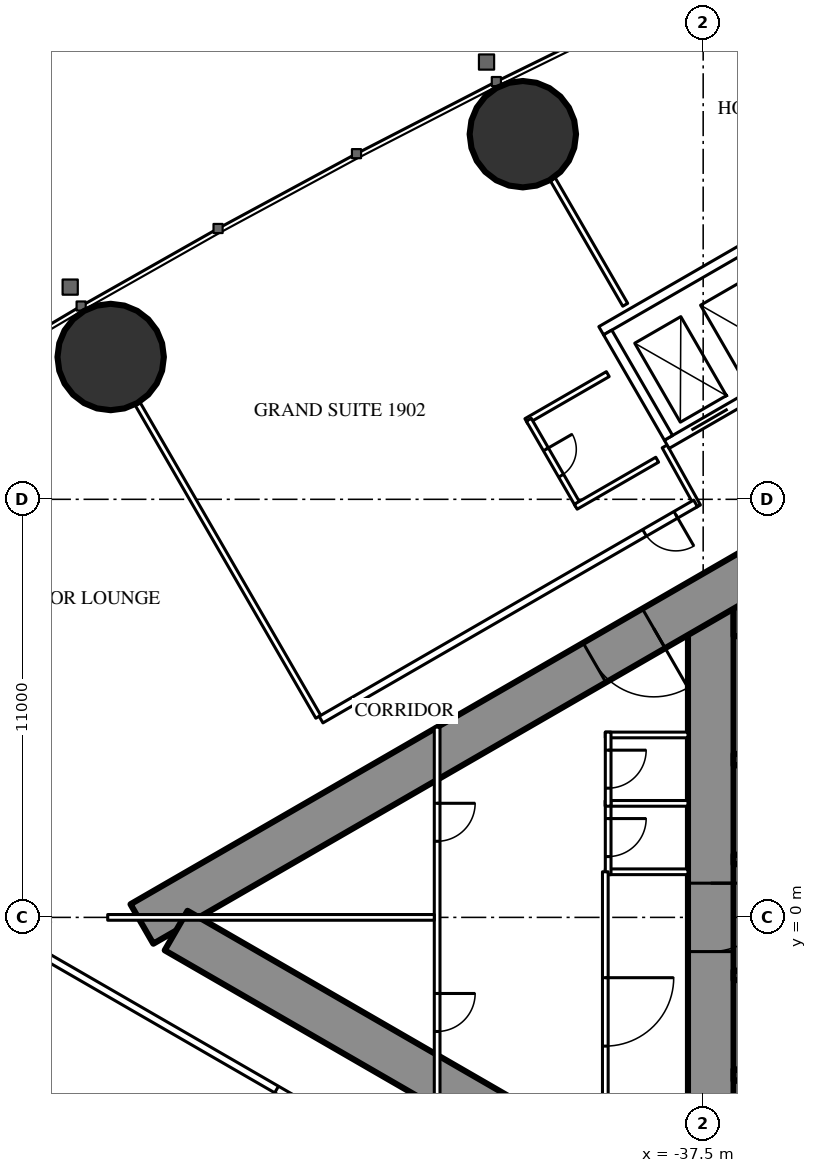
"""IFC4 building model, lengths in metres.
Left out: names, types, materials, properties, quantities, classifications, styles, units other than length and angle.
Written with IfcOpenShell. Run it as: python <this file> out.ifc"""

import sys

from ifc_helpers import new_model, si_unit, direction, frame, frame_2d, origin, origin_2d, place, context, subcontext, project, spatial, rectangle, hollow_circle, extrude, element, fill, save


model = new_model("IFC4")
c1 = context("Model", 3, precision=1e-05, world=origin(), true_north=direction((0.0, 1.0)))
c2 = subcontext(c1, "Body", "Model", "MODEL_VIEW")
j1 = project(units=[si_unit("LENGTHUNIT", "METRE"), si_unit("PLANEANGLEUNIT", "RADIAN")], contexts=[c1])
p1 = place(None, origin())
s1 = spatial("IfcSite", under=j1, at=p1, CompositionType="ELEMENT")
p2 = place(p1, origin())
s2 = spatial("IfcBuilding", under=s1, at=p2, CompositionType="ELEMENT")
p3 = place(p2, frame((0.0, 0.0, 74.0)))
s3 = spatial("IfcBuildingStorey", under=s2, at=p3, CompositionType="ELEMENT", Elevation=74.0)
for number, where, z_axis, x_axis in (
    (1, (-42.245, 20.607, 0.0), (0.0, 0.0, 1.0), (1.0, 0.0, 0.0)),
    (2, (-53.09, 14.745, 0.0), (0.0, 0.0, 1.0), (1.0, 0.0, 0.0)),
):
    element("IfcColumn", number, at=place(p3, frame(where, z_axis=z_axis, x_axis=x_axis)), inside=s3, PredefinedType="COLUMN", context=c2, shape_type="SweptSolid", body=[
        extrude(hollow_circle(Radius=1.4, WallThickness=0.12, at=origin_2d()), origin(), (0.0, 0.0, 1.0), 3.5),
    ])
p4 = place(p3, frame((-37.3, 8.6, 0.0), z_axis=(0.0, 0.0, 1.0), x_axis=(0.0, -1.0, 0.0)))
e3 = element("IfcWall", 3, at=p4, inside=s3, PredefinedType="SHEAR", context=c2, shape_type="SweptSolid", body=[
    extrude(rectangle(XDim=17.2, YDim=1.2, at=frame_2d((8.6, 0.0))), origin(), (0.0, 0.0, 1.0), 3.5),
])
p5 = place(p4, frame((7.7, 0.0, 0.0)))
e4 = element("IfcOpeningElement", 4, at=p5, cuts=e3, PredefinedType="OPENING", context=c2, shape_type="SweptSolid", body=[
    extrude(rectangle(XDim=1.8, YDim=2.2, at=frame_2d((0.9, 1.1))), frame((0.0, 0.61, 0.0), z_axis=(0.0, -1.0, 0.0), x_axis=(1.0, 0.0, 0.0)), (0.0, 0.0, 1.0), 1.22),
])
p6 = place(p3, frame((-28.3, 8.0, 0.0), z_axis=(0.0, 0.0, 1.0), x_axis=(-1.0, 0.0, 0.0)))
e5 = element("IfcWall", 5, at=p6, inside=s3, PredefinedType="SHEAR", context=c2, shape_type="SweptSolid", body=[
    extrude(rectangle(XDim=8.4, YDim=1.2, at=frame_2d((4.2, 0.0))), origin(), (0.0, 0.0, 1.0), 3.5),
])
p7 = place(p6, frame((0.25, 0.0, 0.0)))
e6 = element("IfcOpeningElement", 6, at=p7, cuts=e5, PredefinedType="OPENING", context=c2, shape_type="SweptSolid", body=[
    extrude(rectangle(XDim=1.0, YDim=2.2, at=frame_2d((0.5, 1.1))), frame((0.0, 0.61, 0.0), z_axis=(0.0, -1.0, 0.0), x_axis=(1.0, 0.0, 0.0)), (0.0, 0.0, 1.0), 1.22),
])
for number, where, z_axis, x_axis in (
    (7, (-28.3, 4.15, 0.0), (0.0, 0.0, 1.0), (-1.0, 0.0, 0.0)),
    (8, (-28.3, -4.15, 0.0), (0.0, 0.0, 1.0), (-1.0, 0.0, 0.0)),
):
    element("IfcWall", number, at=place(p3, frame(where, z_axis=z_axis, x_axis=x_axis)), inside=s3, PredefinedType="SHEAR", context=c2, shape_type="SweptSolid", body=[
        extrude(rectangle(XDim=8.4, YDim=0.3, at=frame_2d((4.2, 0.0))), origin(), (0.0, 0.0, 1.0), 3.5),
    ])
for number, where, z_axis, x_axis in (
    (9, (-34.25, 1.525, 0.0), (0.0, 0.0, 1.0), (-1.0, 0.0, 0.0)),
    (10, (-34.25, -1.525, 0.0), (0.0, 0.0, 1.0), (-1.0, 0.0, 0.0)),
):
    element("IfcWall", number, at=place(p3, frame(where, z_axis=z_axis, x_axis=x_axis)), inside=s3, PredefinedType="SHEAR", context=c2, shape_type="SweptSolid", body=[
        extrude(rectangle(XDim=2.45, YDim=0.25, at=frame_2d((1.225, 0.0))), origin(), (0.0, 0.0, 1.0), 3.5),
    ])
p8 = place(p3, frame((-27.2, 14.3, 0.0), z_axis=(0.0, 0.0, 1.0), x_axis=(-0.866026593062, -0.499997940104, 0.0)))
e11 = element("IfcWall", 11, at=p8, inside=s3, PredefinedType="SHEAR", context=c2, shape_type="SweptSolid", body=[
    extrude(rectangle(XDim=28.946, YDim=1.2, at=frame_2d((14.473, 0.0))), origin(), (0.0, 0.0, 1.0), 3.5),
])
p9 = place(p8, frame((4.6, 0.0, 0.0)))
e12 = element("IfcOpeningElement", 12, at=p9, cuts=e11, PredefinedType="OPENING", context=c2, shape_type="SweptSolid", body=[
    extrude(rectangle(XDim=1.0, YDim=2.2, at=frame_2d((0.5, 1.1))), frame((0.0, 0.61, 0.0), z_axis=(0.0, -1.0, 0.0), x_axis=(1.0, 0.0, 0.0)), (0.0, 0.0, 1.0), 1.22),
])
p10 = place(p8, frame((13.395, 0.0, 0.0)))
e13 = element("IfcOpeningElement", 13, at=p10, cuts=e11, PredefinedType="OPENING", context=c2, shape_type="SweptSolid", body=[
    extrude(rectangle(XDim=1.8, YDim=2.2, at=frame_2d((0.9, 1.1))), frame((0.0, 0.61, 0.0), z_axis=(0.0, -1.0, 0.0), x_axis=(1.0, 0.0, 0.0)), (0.0, 0.0, 1.0), 1.22),
])
p11 = place(p3, frame((-27.2, -14.3, 0.0), z_axis=(0.0, 0.0, 1.0), x_axis=(-0.866024021859, 0.500002393557, 0.0)))
e14 = element("IfcWall", 14, at=p11, inside=s3, PredefinedType="SHEAR", context=c2, shape_type="SweptSolid", body=[
    extrude(rectangle(XDim=27.907, YDim=1.2, at=frame_2d((13.954, 0.0))), origin(), (0.0, 0.0, 1.0), 3.5),
])
p12 = place(p11, frame((4.6, 0.0, 0.0)))
e15 = element("IfcOpeningElement", 15, at=p12, cuts=e14, PredefinedType="OPENING", context=c2, shape_type="SweptSolid", body=[
    extrude(rectangle(XDim=1.0, YDim=2.2, at=frame_2d((0.5, 1.1))), frame((0.0, 0.61, 0.0), z_axis=(0.0, -1.0, 0.0), x_axis=(1.0, 0.0, 0.0)), (0.0, 0.0, 1.0), 1.22),
])
p13 = place(p11, frame((13.395, 0.0, 0.0)))
e16 = element("IfcOpeningElement", 16, at=p13, cuts=e14, PredefinedType="OPENING", context=c2, shape_type="SweptSolid", body=[
    extrude(rectangle(XDim=1.8, YDim=2.2, at=frame_2d((0.9, 1.1))), frame((0.0, 0.61, 0.0), z_axis=(0.0, -1.0, 0.0), x_axis=(1.0, 0.0, 0.0)), (0.0, 0.0, 1.0), 1.22),
])
p14 = place(p3, frame((-47.627, 5.278, 0.0), z_axis=(0.0, 0.0, 1.0), x_axis=(-0.500009844318, 0.86601972009, 0.0)))
e17 = element("IfcWall", 17, at=p14, inside=s3, PredefinedType="PARTITIONING", context=c2, shape_type="SweptSolid", body=[
    extrude(rectangle(XDim=9.51, YDim=0.15, at=frame_2d((4.755, 0.0))), origin(), (0.0, 0.0, 1.0), 2.25),
])
p15 = place(p3, frame((-39.551, 16.119, 0.0), z_axis=(0.0, 0.0, 1.0), x_axis=(-0.500014214979, 0.866017196607, 0.0)))
e18 = element("IfcWall", 18, at=p15, inside=s3, PredefinedType="PARTITIONING", context=c2, shape_type="SweptSolid", body=[
    extrude(rectangle(XDim=3.815, YDim=0.15, at=frame_2d((1.907, 0.0))), origin(), (0.0, 0.0, 1.0), 3.25),
])
p16 = place(p3, frame((-36.92, -11.344, 0.0), z_axis=(0.0, 0.0, 1.0), x_axis=(-0.866028313256, 0.499994960614, 0.0)))
e19 = element("IfcWall", 19, at=p16, inside=s3, PredefinedType="PARTITIONING", context=c2, shape_type="SweptSolid", body=[
    extrude(rectangle(XDim=22.568, YDim=0.2, at=frame_2d((11.284, 0.0))), origin(), (0.0, 0.0, 1.0), 3.25),
])
p17 = place(p16, frame((20.958, 0.0, 0.0)))
e20 = element("IfcOpeningElement", 20, at=p17, cuts=e19, PredefinedType="OPENING", context=c2, shape_type="SweptSolid", body=[
    extrude(rectangle(XDim=0.95, YDim=2.2, at=frame_2d((0.475, 1.1))), frame((0.0, 0.11, 0.0), z_axis=(0.0, -1.0, 0.0), x_axis=(1.0, 0.0, 0.0)), (0.0, 0.0, 1.0), 0.22),
])
p18 = place(p16, frame((12.68, 0.0, 0.0)))
e21 = element("IfcOpeningElement", 21, at=p18, cuts=e19, PredefinedType="OPENING", context=c2, shape_type="SweptSolid", body=[
    extrude(rectangle(XDim=0.95, YDim=2.2, at=frame_2d((0.475, 1.1))), frame((0.0, 0.11, 0.0), z_axis=(0.0, -1.0, 0.0), x_axis=(1.0, 0.0, 0.0)), (0.0, 0.0, 1.0), 0.22),
])
p19 = place(p16, frame((3.35, 0.0, 0.0)))
e22 = element("IfcOpeningElement", 22, at=p19, cuts=e19, PredefinedType="OPENING", context=c2, shape_type="SweptSolid", body=[
    extrude(rectangle(XDim=1.0, YDim=2.2, at=frame_2d((0.5, 1.1))), frame((0.0, 0.11, 0.0), z_axis=(0.0, -1.0, 0.0), x_axis=(1.0, 0.0, 0.0)), (0.0, 0.0, 1.0), 0.22),
])
p20 = place(p3, frame((-38.513, 12.392, 0.0), z_axis=(0.0, 0.0, 1.0), x_axis=(0.485585508183, -0.874189175317, 0.0)))
e23 = element("IfcWall", 23, at=p20, inside=s3, PredefinedType="PARTITIONING", context=c2, shape_type="SweptSolid", body=[
    extrude(rectangle(XDim=1.805, YDim=0.15, at=frame_2d((0.902, 0.0))), origin(), (0.0, 0.0, 1.0), 3.25),
])
p21 = place(p3, frame((-37.7, 10.894, 0.0), z_axis=(0.0, 0.0, 1.0), x_axis=(-0.866024459167, -0.500001636122, 0.0)))
e24 = element("IfcWall", 24, at=p21, inside=s3, PredefinedType="PARTITIONING", context=c2, shape_type="SweptSolid", body=[
    extrude(rectangle(XDim=11.38, YDim=0.2, at=frame_2d((5.69, 0.0))), origin(), (0.0, 0.0, 1.0), 3.25),
])
p22 = place(p21, frame((0.6, 0.0, 0.0)))
e25 = element("IfcOpeningElement", 25, at=p22, cuts=e24, PredefinedType="OPENING", context=c2, shape_type="SweptSolid", body=[
    extrude(rectangle(XDim=0.95, YDim=2.2, at=frame_2d((0.475, 1.1))), frame((0.0, 0.11, 0.0), z_axis=(0.0, -1.0, 0.0), x_axis=(1.0, 0.0, 0.0)), (0.0, 0.0, 1.0), 0.22),
])
p23 = place(p3, frame((-40.01, 14.294, 0.0), z_axis=(0.0, 0.0, 1.0), x_axis=(-0.866031185235, -0.4999899861, 0.0)))
e26 = element("IfcWall", 26, at=p23, inside=s3, PredefinedType="PARTITIONING", context=c2, shape_type="SweptSolid", body=[
    extrude(rectangle(XDim=2.475, YDim=0.15, at=frame_2d((1.238, 0.0))), origin(), (0.0, 0.0, 1.0), 3.25),
])
p24 = place(p3, frame((-40.788, 10.843, 0.0), z_axis=(0.0, 0.0, 1.0), x_axis=(-0.500006934395, 0.866021400173, 0.0)))
e27 = element("IfcWall", 27, at=p24, inside=s3, PredefinedType="PARTITIONING", context=c2, shape_type="SweptSolid", body=[
    extrude(rectangle(XDim=2.6, YDim=0.15, at=frame_2d((1.3, 0.0))), origin(), (0.0, 0.0, 1.0), 3.25),
])
p25 = place(p24, frame((0.9, 0.0, 0.0)))
e28 = element("IfcOpeningElement", 28, at=p25, cuts=e27, PredefinedType="OPENING", context=c2, shape_type="SweptSolid", body=[
    extrude(rectangle(XDim=0.8, YDim=2.2, at=frame_2d((0.4, 1.1))), frame((0.0, 0.085, 0.0), z_axis=(0.0, -1.0, 0.0), x_axis=(1.0, 0.0, 0.0)), (0.0, 0.0, 1.0), 0.17),
])
p26 = place(p3, frame((-38.71, 12.042, 0.0), z_axis=(0.0, 0.0, 1.0), x_axis=(-0.86604923931, -0.499958713387, 0.0)))
e29 = element("IfcWall", 29, at=p26, inside=s3, PredefinedType="PARTITIONING", context=c2, shape_type="SweptSolid", body=[
    extrude(rectangle(XDim=2.475, YDim=0.15, at=frame_2d((1.237, 0.0))), origin(), (0.0, 0.0, 1.0), 3.25),
])
for number, where, z_axis, x_axis in (
    (30, (-37.9, 1.2, 0.0), (0.0, 0.0, 1.0), (-1.0, 0.0, 0.0)),
    (31, (-37.9, 3.0, 0.0), (0.0, 0.0, 1.0), (-1.0, 0.0, 0.0)),
    (32, (-37.9, 4.8, 0.0), (0.0, 0.0, 1.0), (-1.0, 0.0, 0.0)),
):
    element("IfcWall", number, at=place(p3, frame(where, z_axis=z_axis, x_axis=x_axis)), inside=s3, PredefinedType="PARTITIONING", context=c2, shape_type="SweptSolid", body=[
        extrude(rectangle(XDim=2.175, YDim=0.15, at=frame_2d((1.087, 0.0))), origin(), (0.0, 0.0, 1.0), 3.25),
    ])
p27 = place(p3, frame((-40.0, 3.075, 0.0), z_axis=(0.0, 0.0, 1.0), x_axis=(0.0, -1.0, 0.0)))
e33 = element("IfcWall", 33, at=p27, inside=s3, PredefinedType="PARTITIONING", context=c2, shape_type="SweptSolid", body=[
    extrude(rectangle(XDim=1.95, YDim=0.15, at=frame_2d((0.975, 0.0))), origin(), (0.0, 0.0, 1.0), 3.25),
])
p28 = place(p27, frame((0.475, 0.0, 0.0)))
e34 = element("IfcOpeningElement", 34, at=p28, cuts=e33, PredefinedType="OPENING", context=c2, shape_type="SweptSolid", body=[
    extrude(rectangle(XDim=1.0, YDim=2.2, at=frame_2d((0.5, 1.1))), frame((0.0, 0.085, 0.0), z_axis=(0.0, -1.0, 0.0), x_axis=(1.0, 0.0, 0.0)), (0.0, 0.0, 1.0), 0.17),
])
p29 = place(p3, frame((-40.0, 4.875, 0.0), z_axis=(0.0, 0.0, 1.0), x_axis=(0.0, -1.0, 0.0)))
e35 = element("IfcWall", 35, at=p29, inside=s3, PredefinedType="PARTITIONING", context=c2, shape_type="SweptSolid", body=[
    extrude(rectangle(XDim=1.95, YDim=0.15, at=frame_2d((0.975, 0.0))), origin(), (0.0, 0.0, 1.0), 3.25),
])
p30 = place(p29, frame((0.475, 0.0, 0.0)))
e36 = element("IfcOpeningElement", 36, at=p30, cuts=e35, PredefinedType="OPENING", context=c2, shape_type="SweptSolid", body=[
    extrude(rectangle(XDim=1.0, YDim=2.2, at=frame_2d((0.5, 1.1))), frame((0.0, 0.085, 0.0), z_axis=(0.0, -1.0, 0.0), x_axis=(1.0, 0.0, 0.0)), (0.0, 0.0, 1.0), 0.17),
])
p31 = place(p3, frame((-40.075, 1.2, 0.0), z_axis=(0.0, 0.0, 1.0), x_axis=(0.0, -1.0, 0.0)))
e37 = element("IfcWall", 37, at=p31, inside=s3, PredefinedType="PARTITIONING", context=c2, shape_type="SweptSolid", body=[
    extrude(rectangle(XDim=7.374, YDim=0.15, at=frame_2d((3.687, 0.0))), origin(), (0.0, 0.0, 1.0), 3.25),
])
p32 = place(p31, frame((2.787, 0.0, 0.0)))
e38 = element("IfcOpeningElement", 38, at=p32, cuts=e37, PredefinedType="OPENING", context=c2, shape_type="SweptSolid", body=[
    extrude(rectangle(XDim=1.8, YDim=2.2, at=frame_2d((0.9, 1.1))), frame((0.0, 0.085, 0.0), z_axis=(0.0, -1.0, 0.0), x_axis=(1.0, 0.0, 0.0)), (0.0, 0.0, 1.0), 0.17),
])
p33 = place(p3, frame((-44.5, 5.005, 0.0), z_axis=(0.0, 0.0, 1.0), x_axis=(0.0, -1.0, 0.0)))
e39 = element("IfcWall", 39, at=p33, inside=s3, PredefinedType="PARTITIONING", context=c2, shape_type="SweptSolid", body=[
    extrude(rectangle(XDim=10.009, YDim=0.15, at=frame_2d((5.005, 0.0))), origin(), (0.0, 0.0, 1.0), 2.45),
])
p34 = place(p33, frame((2.002, 0.0, 0.0)))
e40 = element("IfcOpeningElement", 40, at=p34, cuts=e39, PredefinedType="OPENING", context=c2, shape_type="SweptSolid", body=[
    extrude(rectangle(XDim=1.0, YDim=2.2, at=frame_2d((0.5, 1.1))), frame((0.0, 0.085, 0.0), z_axis=(0.0, -1.0, 0.0), x_axis=(1.0, 0.0, 0.0)), (0.0, 0.0, 1.0), 0.17),
])
p35 = place(p33, frame((7.007, 0.0, 0.0)))
e41 = element("IfcOpeningElement", 41, at=p35, cuts=e39, PredefinedType="OPENING", context=c2, shape_type="SweptSolid", body=[
    extrude(rectangle(XDim=1.0, YDim=2.2, at=frame_2d((0.5, 1.1))), frame((0.0, 0.085, 0.0), z_axis=(0.0, -1.0, 0.0), x_axis=(1.0, 0.0, 0.0)), (0.0, 0.0, 1.0), 0.17),
])
p36 = place(p3, frame((-44.575, 0.0, 0.0), z_axis=(0.0, 0.0, 1.0), x_axis=(-1.0, 0.0, 0.0)))
e42 = element("IfcWall", 42, at=p36, inside=s3, PredefinedType="PARTITIONING", context=c2, shape_type="SweptSolid", body=[
    extrude(rectangle(XDim=8.593, YDim=0.15, at=frame_2d((4.297, 0.0))), origin(), (0.0, 0.0, 1.0), 2.25),
])
p37 = place(p3, frame((-31.01, 16.747, 0.0), z_axis=(0.0, 0.0, 1.0), x_axis=(-0.866028165386, -0.499995216735, 0.0)))
e43 = element("IfcWall", 43, at=p37, inside=s3, PredefinedType="PARTITIONING", context=c2, shape_type="SweptSolid", body=[
    extrude(rectangle(XDim=8.6, YDim=0.25, at=frame_2d((4.3, 0.0))), origin(), (0.0, 0.0, 1.0), 3.25),
])
p38 = place(p37, frame((0.75, 0.0, 0.0)))
e44 = element("IfcOpeningElement", 44, at=p38, cuts=e43, PredefinedType="OPENING", context=c2, shape_type="SweptSolid", body=[
    extrude(rectangle(XDim=1.1, YDim=2.2, at=frame_2d((0.55, 1.1))), frame((0.0, 0.135, 0.0), z_axis=(0.0, -1.0, 0.0), x_axis=(1.0, 0.0, 0.0)), (0.0, 0.0, 1.0), 0.27),
])
p39 = place(p37, frame((2.75, 0.0, 0.0)))
e45 = element("IfcOpeningElement", 45, at=p39, cuts=e43, PredefinedType="OPENING", context=c2, shape_type="SweptSolid", body=[
    extrude(rectangle(XDim=1.1, YDim=2.2, at=frame_2d((0.55, 1.1))), frame((0.0, 0.135, 0.0), z_axis=(0.0, -1.0, 0.0), x_axis=(1.0, 0.0, 0.0)), (0.0, 0.0, 1.0), 0.27),
])
p40 = place(p37, frame((4.75, 0.0, 0.0)))
e46 = element("IfcOpeningElement", 46, at=p40, cuts=e43, PredefinedType="OPENING", context=c2, shape_type="SweptSolid", body=[
    extrude(rectangle(XDim=1.1, YDim=2.2, at=frame_2d((0.55, 1.1))), frame((0.0, 0.135, 0.0), z_axis=(0.0, -1.0, 0.0), x_axis=(1.0, 0.0, 0.0)), (0.0, 0.0, 1.0), 0.27),
])
p41 = place(p37, frame((6.75, 0.0, 0.0)))
e47 = element("IfcOpeningElement", 47, at=p41, cuts=e43, PredefinedType="OPENING", context=c2, shape_type="SweptSolid", body=[
    extrude(rectangle(XDim=1.1, YDim=2.2, at=frame_2d((0.55, 1.1))), frame((0.0, 0.135, 0.0), z_axis=(0.0, -1.0, 0.0), x_axis=(1.0, 0.0, 0.0)), (0.0, 0.0, 1.0), 0.27),
])
p42 = place(p3, frame((-32.736, 19.736, 0.0), z_axis=(0.0, 0.0, 1.0), x_axis=(-0.866028165386, -0.499995216735, 0.0)))
e48 = element("IfcWall", 48, at=p42, inside=s3, PredefinedType="PARTITIONING", context=c2, shape_type="SweptSolid", body=[
    extrude(rectangle(XDim=8.6, YDim=0.25, at=frame_2d((4.3, 0.0))), origin(), (0.0, 0.0, 1.0), 3.25),
])
p43 = place(p3, frame((-38.413, 12.618, 0.0), z_axis=(0.0, 0.0, 1.0), x_axis=(-0.499872130319, 0.866099216793, 0.0)))
e49 = element("IfcWall", 49, at=p43, inside=s3, PredefinedType="PARTITIONING", context=c2, shape_type="SweptSolid", body=[
    extrude(rectangle(XDim=3.2, YDim=0.25, at=frame_2d((1.6, 0.0))), origin(), (0.0, 0.0, 1.0), 3.25),
])
p44 = place(p18, origin())
e50 = element("IfcDoor", 50, at=p44, inside=s3, OperationType="SINGLE_SWING_LEFT", PredefinedType="DOOR", context=c2, shape_type="SweptSolid", body=[
    extrude(rectangle(XDim=0.95, YDim=2.2, at=frame_2d((0.475, 1.1))), frame((0.0, 0.025, 0.0), z_axis=(0.0, -1.0, 0.0), x_axis=(1.0, 0.0, 0.0)), (0.0, 0.0, 1.0), 0.05),
])
fill(e21, e50)
p45 = place(p25, origin())
e51 = element("IfcDoor", 51, at=p45, inside=s3, OperationType="SINGLE_SWING_RIGHT", PredefinedType="DOOR", context=c2, shape_type="SweptSolid", body=[
    extrude(rectangle(XDim=0.8, YDim=2.2, at=frame_2d((0.4, 1.1))), frame((0.0, 0.025, 0.0), z_axis=(0.0, -1.0, 0.0), x_axis=(1.0, 0.0, 0.0)), (0.0, 0.0, 1.0), 0.05),
])
fill(e28, e51)
p46 = place(p22, origin())
e52 = element("IfcDoor", 52, at=p46, inside=s3, OperationType="SINGLE_SWING_LEFT", PredefinedType="DOOR", context=c2, shape_type="SweptSolid", body=[
    extrude(rectangle(XDim=0.95, YDim=2.2, at=frame_2d((0.475, 1.1))), frame((0.0, 0.025, 0.0), z_axis=(0.0, -1.0, 0.0), x_axis=(1.0, 0.0, 0.0)), (0.0, 0.0, 1.0), 0.05),
])
fill(e25, e52)
p47 = place(p28, origin())
e53 = element("IfcDoor", 53, at=p47, inside=s3, OperationType="SINGLE_SWING_LEFT", PredefinedType="DOOR", context=c2, shape_type="SweptSolid", body=[
    extrude(rectangle(XDim=1.0, YDim=2.2, at=frame_2d((0.5, 1.1))), frame((0.0, 0.025, 0.0), z_axis=(0.0, -1.0, 0.0), x_axis=(1.0, 0.0, 0.0)), (0.0, 0.0, 1.0), 0.05),
])
fill(e34, e53)
p48 = place(p30, origin())
e54 = element("IfcDoor", 54, at=p48, inside=s3, OperationType="SINGLE_SWING_LEFT", PredefinedType="DOOR", context=c2, shape_type="SweptSolid", body=[
    extrude(rectangle(XDim=1.0, YDim=2.2, at=frame_2d((0.5, 1.1))), frame((0.0, 0.025, 0.0), z_axis=(0.0, -1.0, 0.0), x_axis=(1.0, 0.0, 0.0)), (0.0, 0.0, 1.0), 0.05),
])
fill(e36, e54)
p49 = place(p32, origin())
e55 = element("IfcDoor", 55, at=p49, inside=s3, OperationType="DOUBLE_DOOR_SINGLE_SWING", PredefinedType="DOOR", context=c2, shape_type="SweptSolid", body=[
    extrude(rectangle(XDim=1.8, YDim=2.2, at=frame_2d((0.9, 1.1))), frame((0.0, 0.025, 0.0), z_axis=(0.0, -1.0, 0.0), x_axis=(1.0, 0.0, 0.0)), (0.0, 0.0, 1.0), 0.05),
])
fill(e38, e55)
p50 = place(p34, origin())
e56 = element("IfcDoor", 56, at=p50, inside=s3, OperationType="SINGLE_SWING_LEFT", PredefinedType="DOOR", context=c2, shape_type="SweptSolid", body=[
    extrude(rectangle(XDim=1.0, YDim=2.2, at=frame_2d((0.5, 1.1))), frame((0.0, 0.025, 0.0), z_axis=(0.0, -1.0, 0.0), x_axis=(1.0, 0.0, 0.0)), (0.0, 0.0, 1.0), 0.05),
])
fill(e40, e56)
p51 = place(p35, origin())
e57 = element("IfcDoor", 57, at=p51, inside=s3, OperationType="SINGLE_SWING_LEFT", PredefinedType="DOOR", context=c2, shape_type="SweptSolid", body=[
    extrude(rectangle(XDim=1.0, YDim=2.2, at=frame_2d((0.5, 1.1))), frame((0.0, 0.025, 0.0), z_axis=(0.0, -1.0, 0.0), x_axis=(1.0, 0.0, 0.0)), (0.0, 0.0, 1.0), 0.05),
])
fill(e41, e57)
p52 = place(p10, origin())
e58 = element("IfcDoor", 58, at=p52, inside=s3, OperationType="DOUBLE_DOOR_SINGLE_SWING", PredefinedType="DOOR", context=c2, shape_type="SweptSolid", body=[
    extrude(rectangle(XDim=1.8, YDim=2.2, at=frame_2d((0.9, 1.1))), frame((0.0, 0.025, 0.0), z_axis=(0.0, -1.0, 0.0), x_axis=(1.0, 0.0, 0.0)), (0.0, 0.0, 1.0), 0.05),
])
fill(e13, e58)
p53 = place(p5, origin())
e59 = element("IfcDoor", 59, at=p53, inside=s3, OperationType="DOUBLE_DOOR_SINGLE_SWING", PredefinedType="DOOR", context=c2, shape_type="SweptSolid", body=[
    extrude(rectangle(XDim=1.8, YDim=2.2, at=frame_2d((0.9, 1.1))), frame((0.0, 0.025, 0.0), z_axis=(0.0, -1.0, 0.0), x_axis=(1.0, 0.0, 0.0)), (0.0, 0.0, 1.0), 0.05),
])
fill(e4, e59)
p54 = place(p41, origin())
e60 = element("IfcDoor", 60, at=p54, inside=s3, OperationType="DOUBLE_DOOR_SLIDING", PredefinedType="USERDEFINED", context=c2, shape_type="SweptSolid", body=[
    extrude(rectangle(XDim=1.1, YDim=2.2, at=frame_2d((0.55, 1.1))), frame((0.0, 0.025, 0.0), z_axis=(0.0, -1.0, 0.0), x_axis=(1.0, 0.0, 0.0)), (0.0, 0.0, 1.0), 0.05),
])
fill(e47, e60)
save(model, sys.argv[1])
